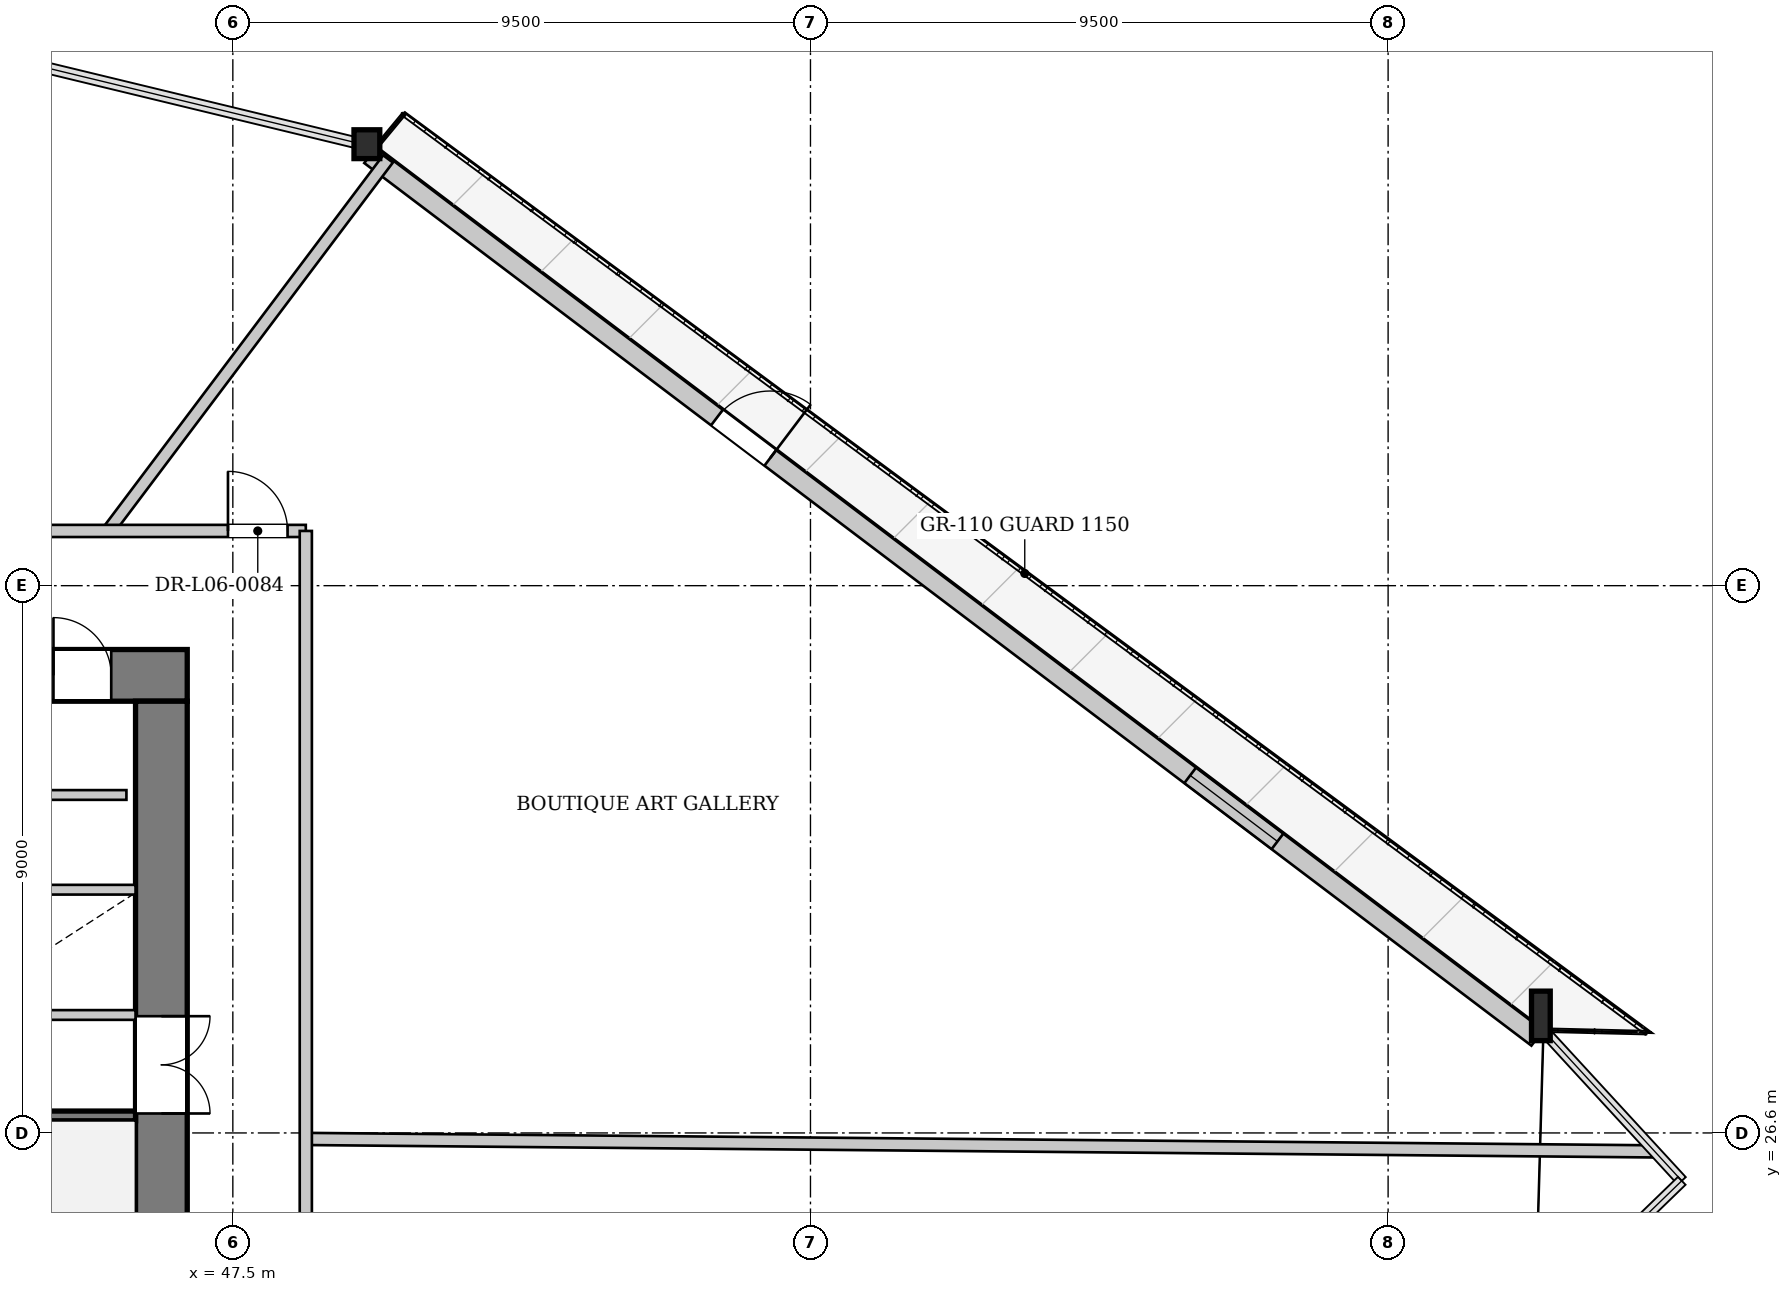
"""IFC4 building model, lengths in metres.
Left out: names, types, materials, properties, quantities, classifications, styles, units other than length and angle.
Written with IfcOpenShell. Run it as: python <this file> out.ifc"""

import sys

from ifc_helpers import new_model, si_unit, direction, frame, frame_2d, origin, origin_2d, place, context, subcontext, project, spatial, rectangle, i_section, extrude, source, transform, mapped, element, fill, save


model = new_model("IFC4")
c1 = context("Model", 3, precision=1e-05, world=origin(), true_north=direction((0.0, 1.0)))
c2 = subcontext(c1, "Body", "Model", "MODEL_VIEW")
j1 = project(units=[si_unit("LENGTHUNIT", "METRE"), si_unit("PLANEANGLEUNIT", "RADIAN")], contexts=[c1])
p1 = place(None, origin())
s1 = spatial("IfcSite", under=j1, at=p1, CompositionType="ELEMENT")
p2 = place(p1, origin())
s2 = spatial("IfcBuilding", under=s1, at=p2, CompositionType="ELEMENT")
p3 = place(p2, frame((0.0, 0.0, 29.3)))
s3 = spatial("IfcBuildingStorey", under=s2, at=p3, CompositionType="ELEMENT", Elevation=29.3)
m1 = source(origin(), c2, "Body", "SweptSolid", [
    extrude(i_section(OverallWidth=0.308, OverallDepth=0.814, WebThickness=0.021, FlangeThickness=0.04, at=origin_2d()), origin(), (0.0, 0.0, 1.0), 3.418),
])
p4 = place(p3, frame((69.05, 28.291, 0.0), z_axis=(-0.021856338759, 0.13706638588, 0.99032070882), x_axis=(-0.987523986633, -0.157468650292, 0.0)))
e1 = element("IfcColumn", 1, at=p4, inside=s3, PredefinedType="COLUMN", context=c2, shape_type="MappedRepresentation", body=[
    mapped(m1, transform((0.0, 0.0, 0.0), x_axis=(1.0, 0.0, 0.0), y_axis=(0.0, 1.0, 0.0), z_axis=(0.0, 0.0, 1.0), scale=1.0)),
])
m2 = source(origin(), c2, "Body", "SweptSolid", [
    extrude(i_section(OverallWidth=0.424, OverallDepth=0.474, WebThickness=0.043, FlangeThickness=0.068, at=origin_2d()), origin(), (0.0, 0.0, 1.0), 3.4),
])
p5 = place(p3, frame((49.854, 42.805, 0.0), z_axis=(-0.088177327317, 0.032168927229, 0.995585214368), x_axis=(-0.342725666193, -0.93943553144, 0.0)))
e2 = element("IfcColumn", 2, at=p5, inside=s3, PredefinedType="COLUMN", context=c2, shape_type="MappedRepresentation", body=[
    mapped(m2, transform((0.0, 0.0, 0.0), x_axis=(1.0, 0.0, 0.0), y_axis=(0.0, 1.0, 0.0), z_axis=(0.0, 0.0, 1.0), scale=1.0)),
])
p6 = place(p3, frame((49.758, 42.678, 0.0), z_axis=(0.0, 0.0, 1.0), x_axis=(0.79763695193, -0.603137872229, 0.0)))
e3 = element("IfcWall", 3, at=p6, inside=s3, PredefinedType="SOLIDWALL", context=c2, shape_type="SweptSolid", body=[
    extrude(rectangle(XDim=24.065, YDim=0.32, at=frame_2d((12.033, 0.0))), origin(), (0.0, 0.0, 1.0), 2.592),
])
p7 = place(p6, frame((7.151, 0.0, 0.0)))
e4 = element("IfcOpeningElement", 4, at=p7, cuts=e3, PredefinedType="OPENING", context=c2, shape_type="SweptSolid", body=[
    extrude(rectangle(XDim=1.1, YDim=2.3, at=frame_2d((0.55, 1.15))), frame((0.0, 0.17, 0.0), z_axis=(0.0, -1.0, 0.0), x_axis=(1.0, 0.0, 0.0)), (0.0, 0.0, 1.0), 0.34),
])
p8 = place(p6, frame((16.908, 0.0, 0.272)))
e5 = element("IfcOpeningElement", 5, at=p8, cuts=e3, PredefinedType="OPENING", context=c2, shape_type="SweptSolid", body=[
    extrude(rectangle(XDim=1.8, YDim=2.2, at=frame_2d((0.9, 1.1))), frame((0.0, 0.17, 0.0), z_axis=(0.0, -1.0, 0.0), x_axis=(1.0, 0.0, 0.0)), (0.0, 0.0, 1.0), 0.34),
])
p9 = place(p3, frame((29.25, 34.125, 0.0), z_axis=(0.0, 0.0, 1.0), x_axis=(1.0, 0.0, 0.0)))
e6 = element("IfcWall", 6, at=p9, inside=s3, PredefinedType="SHEAR", context=c2, shape_type="SweptSolid", body=[
    extrude(rectangle(XDim=17.5, YDim=0.85, at=frame_2d((8.75, 0.0))), origin(), (0.0, 0.0, 1.0), 3.3),
])
p10 = place(p9, frame((1.85, 0.0, 0.0)))
e7 = element("IfcOpeningElement", 7, at=p10, cuts=e6, PredefinedType="OPENING", context=c2, shape_type="SweptSolid", body=[
    extrude(rectangle(XDim=0.95, YDim=2.1, at=frame_2d((0.475, 1.05))), frame((0.0, 0.435, 0.0), z_axis=(0.0, -1.0, 0.0), x_axis=(1.0, 0.0, 0.0)), (0.0, 0.0, 1.0), 0.87),
])
p11 = place(p9, frame((4.23, 0.0, 0.0)))
e8 = element("IfcOpeningElement", 8, at=p11, cuts=e6, PredefinedType="OPENING", context=c2, shape_type="SweptSolid", body=[
    extrude(rectangle(XDim=1.32, YDim=2.2, at=frame_2d((0.66, 1.1))), frame((0.0, 0.435, 0.0), z_axis=(0.0, -1.0, 0.0), x_axis=(1.0, 0.0, 0.0)), (0.0, 0.0, 1.0), 0.87),
])
p12 = place(p9, frame((15.3, 0.0, 0.0)))
e9 = element("IfcOpeningElement", 9, at=p12, cuts=e6, PredefinedType="OPENING", context=c2, shape_type="SweptSolid", body=[
    extrude(rectangle(XDim=0.95, YDim=2.1, at=frame_2d((0.475, 1.05))), frame((0.0, 0.435, 0.0), z_axis=(0.0, -1.0, 0.0), x_axis=(1.0, 0.0, 0.0)), (0.0, 0.0, 1.0), 0.87),
])
p13 = place(p3, frame((46.325, 33.7, 0.0), z_axis=(0.0, 0.0, 1.0), x_axis=(0.0, -1.0, 0.0)))
e10 = element("IfcWall", 10, at=p13, inside=s3, PredefinedType="SHEAR", context=c2, shape_type="SweptSolid", body=[
    extrude(rectangle(XDim=14.2, YDim=0.85, at=frame_2d((7.1, 0.0))), origin(), (0.0, 0.0, 1.0), 3.3),
])
p14 = place(p13, frame((5.18, 0.0, 0.0)))
e11 = element("IfcOpeningElement", 11, at=p14, cuts=e10, PredefinedType="OPENING", context=c2, shape_type="SweptSolid", body=[
    extrude(rectangle(XDim=1.6, YDim=2.2, at=frame_2d((0.8, 1.1))), frame((0.0, 0.435, 0.0), z_axis=(0.0, -1.0, 0.0), x_axis=(1.0, 0.0, 0.0)), (0.0, 0.0, 1.0), 0.87),
])
p15 = place(p3, frame((42.88, 26.88, 0.0), z_axis=(0.0, 0.0, 1.0), x_axis=(1.0, 0.0, 0.0)))
e12 = element("IfcWall", 12, at=p15, inside=s3, PredefinedType="PARTITIONING", context=c2, shape_type="SweptSolid", body=[
    extrude(rectangle(XDim=3.02, YDim=0.16, at=frame_2d((1.51, 0.0))), origin(), (0.0, 0.0, 1.0), 3.3),
])
p16 = place(p3, frame((33.28, 28.54, 0.0), z_axis=(0.0, 0.0, 1.0), x_axis=(1.0, 0.0, 0.0)))
e13 = element("IfcWall", 13, at=p16, inside=s3, PredefinedType="PARTITIONING", context=c2, shape_type="SweptSolid", body=[
    extrude(rectangle(XDim=12.62, YDim=0.16, at=frame_2d((6.31, 0.0))), origin(), (0.0, 0.0, 1.0), 3.3),
])
p17 = place(p3, frame((40.72, 30.6, 0.0), z_axis=(0.0, 0.0, 1.0), x_axis=(1.0, 0.0, 0.0)))
e14 = element("IfcWall", 14, at=p17, inside=s3, PredefinedType="PARTITIONING", context=c2, shape_type="SweptSolid", body=[
    extrude(rectangle(XDim=5.18, YDim=0.16, at=frame_2d((2.59, 0.0))), origin(), (0.0, 0.0, 1.0), 3.3),
])
p18 = place(p3, frame((40.72, 32.158, 0.0), z_axis=(0.0, 0.0, 1.0), x_axis=(1.0, 0.0, 0.0)))
e15 = element("IfcWall", 15, at=p18, inside=s3, PredefinedType="PARTITIONING", context=c2, shape_type="SweptSolid", body=[
    extrude(rectangle(XDim=5.03, YDim=0.16, at=frame_2d((2.515, 0.0))), origin(), (0.0, 0.0, 1.0), 3.3),
])
p19 = place(p18, frame((2.1, 0.0, 0.0)))
e16 = element("IfcOpeningElement", 16, at=p19, cuts=e15, PredefinedType="OPENING", context=c2, shape_type="SweptSolid", body=[
    extrude(rectangle(XDim=0.95, YDim=2.1, at=frame_2d((0.475, 1.05))), frame((0.0, 0.09, 0.0), z_axis=(0.0, -1.0, 0.0), x_axis=(1.0, 0.0, 0.0)), (0.0, 0.0, 1.0), 0.18),
])
p20 = place(p3, frame((48.7, 26.501, 0.0), z_axis=(0.0, 0.0, 1.0), x_axis=(0.999957523386, -0.009216909663, 0.0)))
e17 = element("IfcWall", 17, at=p20, inside=s3, PredefinedType="PARTITIONING", context=c2, shape_type="SweptSolid", body=[
    extrude(rectangle(XDim=22.144, YDim=0.2, at=frame_2d((11.072, 0.0))), origin(), (0.0, 0.0, 1.0), 2.795),
])
p21 = place(p3, frame((45.448, 36.5, 0.0), z_axis=(0.0, 0.0, 1.0), x_axis=(0.601228787699, 0.799076932993, 0.0)))
e18 = element("IfcWall", 18, at=p21, inside=s3, PredefinedType="PARTITIONING", context=c2, shape_type="SweptSolid", body=[
    extrude(rectangle(XDim=7.657, YDim=0.2, at=frame_2d((3.828, 0.0))), origin(), (0.0, 0.0, 1.0), 3.3),
])
p22 = place(p3, frame((27.3, 36.5, 0.0), z_axis=(0.0, 0.0, 1.0), x_axis=(1.0, 0.0, 0.0)))
e19 = element("IfcWall", 19, at=p22, inside=s3, PredefinedType="PARTITIONING", context=c2, shape_type="SweptSolid", body=[
    extrude(rectangle(XDim=21.4, YDim=0.2, at=frame_2d((10.7, 0.0))), origin(), (0.0, 0.0, 1.0), 3.3),
])
p23 = place(p22, frame((20.12, 0.0, 0.0)))
e20 = element("IfcOpeningElement", 20, at=p23, cuts=e19, PredefinedType="OPENING", context=c2, shape_type="SweptSolid", body=[
    extrude(rectangle(XDim=0.98, YDim=2.15, at=frame_2d((0.49, 1.075))), frame((0.0, 0.11, 0.0), z_axis=(0.0, -1.0, 0.0), x_axis=(1.0, 0.0, 0.0)), (0.0, 0.0, 1.0), 0.22),
])
p24 = place(p22, frame((13.395, 0.0, 0.0)))
e21 = element("IfcOpeningElement", 21, at=p24, cuts=e19, PredefinedType="OPENING", context=c2, shape_type="SweptSolid", body=[
    extrude(rectangle(XDim=0.98, YDim=2.15, at=frame_2d((0.49, 1.075))), frame((0.0, 0.11, 0.0), z_axis=(0.0, -1.0, 0.0), x_axis=(1.0, 0.0, 0.0)), (0.0, 0.0, 1.0), 0.22),
])
p25 = place(p3, frame((48.7, 16.7, 0.0), z_axis=(0.0, 0.0, 1.0), x_axis=(0.0, 1.0, 0.0)))
e22 = element("IfcWall", 22, at=p25, inside=s3, PredefinedType="PARTITIONING", context=c2, shape_type="SweptSolid", body=[
    extrude(rectangle(XDim=19.8, YDim=0.2, at=frame_2d((9.9, 0.0))), origin(), (0.0, 0.0, 1.0), 3.3),
])
m3 = source(origin(), c2, "Body", "SweptSolid", [
    extrude(rectangle(XDim=1.1, YDim=2.3, at=frame_2d((0.55, 1.15))), frame((0.0, 0.025, 0.0), z_axis=(0.0, -1.0, 0.0), x_axis=(1.0, 0.0, 0.0)), (0.0, 0.0, 1.0), 0.05),
])
p26 = place(p7, origin())
e23 = element("IfcDoor", 23, at=p26, inside=s3, OperationType="SINGLE_SWING_RIGHT", PredefinedType="DOOR", context=c2, shape_type="MappedRepresentation", body=[
    mapped(m3, transform((0.0, 0.0, 0.0), x_axis=(1.0, 0.0, 0.0), y_axis=(0.0, 1.0, 0.0), z_axis=(0.0, 0.0, 1.0), scale=1.0)),
])
fill(e4, e23)
m4 = source(origin(), c2, "Body", "SweptSolid", [
    extrude(rectangle(XDim=1.8, YDim=2.2, at=frame_2d((0.9, 1.1))), frame((0.0, 0.03, 0.0), z_axis=(0.0, -1.0, 0.0), x_axis=(1.0, 0.0, 0.0)), (0.0, 0.0, 1.0), 0.06),
])
p27 = place(p8, origin())
e24 = element("IfcWindow", 24, at=p27, inside=s3, PartitioningType="SINGLE_PANEL", PredefinedType="WINDOW", context=c2, shape_type="MappedRepresentation", body=[
    mapped(m4, transform((0.0, 0.0, 0.0), x_axis=(1.0, 0.0, 0.0), y_axis=(0.0, 1.0, 0.0), z_axis=(0.0, 0.0, 1.0), scale=1.0)),
])
fill(e5, e24)
m5 = source(origin(), c2, "Body", "SweptSolid", [
    extrude(rectangle(XDim=1.6, YDim=2.2, at=frame_2d((0.8, 1.1))), frame((0.0, 0.025, 0.0), z_axis=(0.0, -1.0, 0.0), x_axis=(1.0, 0.0, 0.0)), (0.0, 0.0, 1.0), 0.05),
])
p28 = place(p14, origin())
e25 = element("IfcDoor", 25, at=p28, inside=s3, OperationType="DOUBLE_DOOR_SINGLE_SWING", PredefinedType="DOOR", context=c2, shape_type="MappedRepresentation", body=[
    mapped(m5, transform((0.0, 0.0, 0.0), x_axis=(1.0, 0.0, 0.0), y_axis=(0.0, 1.0, 0.0), z_axis=(0.0, 0.0, 1.0), scale=1.0)),
])
fill(e11, e25)
m6 = source(origin(), c2, "Body", "SweptSolid", [
    extrude(rectangle(XDim=0.95, YDim=2.1, at=frame_2d((0.475, 1.05))), frame((0.0, 0.025, 0.0), z_axis=(0.0, -1.0, 0.0), x_axis=(1.0, 0.0, 0.0)), (0.0, 0.0, 1.0), 0.05),
])
p29 = place(p12, origin())
e26 = element("IfcDoor", 26, at=p29, inside=s3, OperationType="SINGLE_SWING_LEFT", PredefinedType="DOOR", context=c2, shape_type="MappedRepresentation", body=[
    mapped(m6, transform((0.0, 0.0, 0.0), x_axis=(1.0, 0.0, 0.0), y_axis=(0.0, 1.0, 0.0), z_axis=(0.0, 0.0, 1.0), scale=1.0)),
])
fill(e9, e26)
m7 = source(origin(), c2, "Body", "SweptSolid", [
    extrude(rectangle(XDim=0.98, YDim=2.15, at=frame_2d((0.49, 1.075))), frame((0.0, 0.025, 0.0), z_axis=(0.0, -1.0, 0.0), x_axis=(1.0, 0.0, 0.0)), (0.0, 0.0, 1.0), 0.05),
])
p30 = place(p23, origin())
e27 = element("IfcDoor", 27, at=p30, inside=s3, OperationType="SINGLE_SWING_LEFT", PredefinedType="DOOR", context=c2, shape_type="MappedRepresentation", body=[
    mapped(m7, transform((0.0, 0.0, 0.0), x_axis=(1.0, 0.0, 0.0), y_axis=(0.0, 1.0, 0.0), z_axis=(0.0, 0.0, 1.0), scale=1.0)),
])
fill(e20, e27)
save(model, sys.argv[1])
